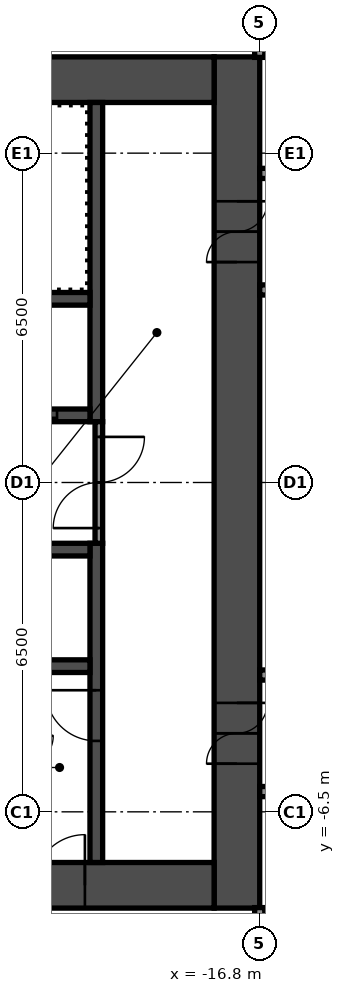
"""IFC4 building model, lengths in metres.
Left out: names, types, materials, properties, quantities, classifications, styles, units other than length and angle.
Written with IfcOpenShell. Run it as: python <this file> out.ifc"""

import sys

from ifc_helpers import new_model, si_unit, direction, frame, frame_2d, origin, place, context, subcontext, project, spatial, rectangle, extrude, element, fill, save


model = new_model("IFC4")
c1 = context("Model", 3, precision=1e-05, world=origin(), true_north=direction((0.0, 1.0)))
c2 = subcontext(c1, "Body", "Model", "MODEL_VIEW")
j1 = project(units=[si_unit("LENGTHUNIT", "METRE"), si_unit("PLANEANGLEUNIT", "RADIAN")], contexts=[c1])
p1 = place(None, origin())
s1 = spatial("IfcSite", under=j1, at=p1, CompositionType="ELEMENT")
p2 = place(p1, origin())
s2 = spatial("IfcBuilding", under=s1, at=p2, CompositionType="ELEMENT")
p3 = place(p2, frame((0.0, 0.0, 19.8)))
s3 = spatial("IfcBuildingStorey", under=s2, at=p3, CompositionType="ELEMENT", Elevation=19.8)
p4 = place(p3, frame((-17.25, -8.4, 0.0), z_axis=(0.0, 0.0, 1.0), x_axis=(0.0, 1.0, 0.0)))
e1 = element("IfcWall", 1, at=p4, inside=s3, PredefinedType="SHEAR", context=c2, shape_type="SweptSolid", body=[
    extrude(rectangle(XDim=16.8, YDim=0.9, at=frame_2d((8.4, 0.0))), origin(), (0.0, 0.0, 1.0), 2.8),
])
p5 = place(p4, frame((12.75, 0.0, 0.0)))
e2 = element("IfcOpeningElement", 2, at=p5, cuts=e1, PredefinedType="OPENING", context=c2, shape_type="SweptSolid", body=[
    extrude(rectangle(XDim=1.2, YDim=2.1, at=frame_2d((0.6, 1.05))), frame((0.0, 0.46, 0.0), z_axis=(0.0, -1.0, 0.0), x_axis=(1.0, 0.0, 0.0)), (0.0, 0.0, 1.0), 0.92),
])
p6 = place(p4, frame((2.85, 0.0, 0.0)))
e3 = element("IfcOpeningElement", 3, at=p6, cuts=e1, PredefinedType="OPENING", context=c2, shape_type="SweptSolid", body=[
    extrude(rectangle(XDim=1.2, YDim=2.1, at=frame_2d((0.6, 1.05))), frame((0.0, 0.46, 0.0), z_axis=(0.0, -1.0, 0.0), x_axis=(1.0, 0.0, 0.0)), (0.0, 0.0, 1.0), 0.92),
])
p7 = place(p3, frame((-32.7, 7.95, 0.0), z_axis=(0.0, 0.0, 1.0), x_axis=(1.0, 0.0, 0.0)))
e4 = element("IfcWall", 4, at=p7, inside=s3, PredefinedType="SHEAR", context=c2, shape_type="SweptSolid", body=[
    extrude(rectangle(XDim=15.0, YDim=0.9, at=frame_2d((7.5, 0.0))), origin(), (0.0, 0.0, 1.0), 2.8),
])
p8 = place(p7, frame((3.4, 0.0, 0.0)))
e5 = element("IfcOpeningElement", 5, at=p8, cuts=e4, PredefinedType="OPENING", context=c2, shape_type="SweptSolid", body=[
    extrude(rectangle(XDim=1.2, YDim=2.1, at=frame_2d((0.6, 1.05))), frame((0.0, 0.46, 0.0), z_axis=(0.0, -1.0, 0.0), x_axis=(1.0, 0.0, 0.0)), (0.0, 0.0, 1.0), 0.92),
])
p9 = place(p7, frame((0.75, 0.0, 0.0)))
e6 = element("IfcOpeningElement", 6, at=p9, cuts=e4, PredefinedType="OPENING", context=c2, shape_type="SweptSolid", body=[
    extrude(rectangle(XDim=0.9, YDim=2.1, at=frame_2d((0.45, 1.05))), frame((0.0, 0.46, 0.0), z_axis=(0.0, -1.0, 0.0), x_axis=(1.0, 0.0, 0.0)), (0.0, 0.0, 1.0), 0.92),
])
p10 = place(p3, frame((-32.7, -7.95, 0.0), z_axis=(0.0, 0.0, 1.0), x_axis=(1.0, 0.0, 0.0)))
e7 = element("IfcWall", 7, at=p10, inside=s3, PredefinedType="SHEAR", context=c2, shape_type="SweptSolid", body=[
    extrude(rectangle(XDim=15.0, YDim=0.9, at=frame_2d((7.5, 0.0))), origin(), (0.0, 0.0, 1.0), 2.8),
])
p11 = place(p10, frame((11.45, 0.0, 0.0)))
e8 = element("IfcOpeningElement", 8, at=p11, cuts=e7, PredefinedType="OPENING", context=c2, shape_type="SweptSolid", body=[
    extrude(rectangle(XDim=1.0, YDim=2.1, at=frame_2d((0.5, 1.05))), frame((0.0, 0.46, 0.0), z_axis=(0.0, -1.0, 0.0), x_axis=(1.0, 0.0, 0.0)), (0.0, 0.0, 1.0), 0.92),
])
p12 = place(p3, frame((-20.025, 1.2, 0.0), z_axis=(0.0, 0.0, 1.0), x_axis=(0.0, 1.0, 0.0)))
e9 = element("IfcWall", 9, at=p12, inside=s3, PredefinedType="SHEAR", context=c2, shape_type="SweptSolid", body=[
    extrude(rectangle(XDim=6.3, YDim=0.25, at=frame_2d((3.15, 0.0))), origin(), (0.0, 0.0, 1.0), 2.8),
])
p13 = place(p3, frame((-20.025, -7.5, 0.0), z_axis=(0.0, 0.0, 1.0), x_axis=(0.0, 1.0, 0.0)))
e10 = element("IfcWall", 10, at=p13, inside=s3, PredefinedType="SHEAR", context=c2, shape_type="SweptSolid", body=[
    extrude(rectangle(XDim=6.3, YDim=0.25, at=frame_2d((3.15, 0.0))), origin(), (0.0, 0.0, 1.0), 2.8),
])
p14 = place(p13, frame((2.4, 0.0, 0.0)))
e11 = element("IfcOpeningElement", 11, at=p14, cuts=e10, PredefinedType="OPENING", context=c2, shape_type="SweptSolid", body=[
    extrude(rectangle(XDim=1.0, YDim=2.1, at=frame_2d((0.5, 1.05))), frame((0.0, 0.135, 0.0), z_axis=(0.0, -1.0, 0.0), x_axis=(1.0, 0.0, 0.0)), (0.0, 0.0, 1.0), 0.27),
])
p15 = place(p3, frame((-27.65, 1.325, 0.0), z_axis=(0.0, 0.0, 1.0), x_axis=(1.0, 0.0, 0.0)))
e12 = element("IfcWall", 12, at=p15, inside=s3, PredefinedType="SHEAR", context=c2, shape_type="SweptSolid", body=[
    extrude(rectangle(XDim=7.5, YDim=0.25, at=frame_2d((3.75, 0.0))), origin(), (0.0, 0.0, 1.0), 2.8),
])
p16 = place(p15, frame((5.75, 0.0, 0.0)))
e13 = element("IfcOpeningElement", 13, at=p16, cuts=e12, PredefinedType="OPENING", context=c2, shape_type="SweptSolid", body=[
    extrude(rectangle(XDim=1.1, YDim=2.1, at=frame_2d((0.55, 1.05))), frame((0.0, 0.135, 0.0), z_axis=(0.0, -1.0, 0.0), x_axis=(1.0, 0.0, 0.0)), (0.0, 0.0, 1.0), 0.27),
])
p17 = place(p15, frame((3.35, 0.0, 0.0)))
e14 = element("IfcOpeningElement", 14, at=p17, cuts=e12, PredefinedType="OPENING", context=c2, shape_type="SweptSolid", body=[
    extrude(rectangle(XDim=1.1, YDim=2.1, at=frame_2d((0.55, 1.05))), frame((0.0, 0.135, 0.0), z_axis=(0.0, -1.0, 0.0), x_axis=(1.0, 0.0, 0.0)), (0.0, 0.0, 1.0), 0.27),
])
p18 = place(p15, frame((0.95, 0.0, 0.0)))
e15 = element("IfcOpeningElement", 15, at=p18, cuts=e12, PredefinedType="OPENING", context=c2, shape_type="SweptSolid", body=[
    extrude(rectangle(XDim=1.1, YDim=2.1, at=frame_2d((0.55, 1.05))), frame((0.0, 0.135, 0.0), z_axis=(0.0, -1.0, 0.0), x_axis=(1.0, 0.0, 0.0)), (0.0, 0.0, 1.0), 0.27),
])
for number, where, z_axis, x_axis in (
    (16, (-27.65, 3.625, 0.0), (0.0, 0.0, 1.0), (1.0, 0.0, 0.0)),
    (17, (-27.65, -1.325, 0.0), (0.0, 0.0, 1.0), (1.0, 0.0, 0.0)),
    (18, (-27.65, -3.625, 0.0), (0.0, 0.0, 1.0), (1.0, 0.0, 0.0)),
):
    element("IfcWall", number, at=place(p3, frame(where, z_axis=z_axis, x_axis=x_axis)), inside=s3, PredefinedType="SHEAR", context=c2, shape_type="SweptSolid", body=[
        extrude(rectangle(XDim=7.5, YDim=0.25, at=frame_2d((3.75, 0.0))), origin(), (0.0, 0.0, 1.0), 2.8),
    ])
p19 = place(p3, frame((-19.975, -1.2, 0.0), z_axis=(0.0, 0.0, 1.0), x_axis=(0.0, 1.0, 0.0)))
e19 = element("IfcWall", 19, at=p19, inside=s3, PredefinedType="PARTITIONING", context=c2, shape_type="SweptSolid", body=[
    extrude(rectangle(XDim=2.4, YDim=0.15, at=frame_2d((1.2, 0.0))), origin(), (0.0, 0.0, 1.0), 2.8),
])
p20 = place(p19, frame((0.3, 0.0, 0.0)))
e20 = element("IfcOpeningElement", 20, at=p20, cuts=e19, PredefinedType="OPENING", context=c2, shape_type="SweptSolid", body=[
    extrude(rectangle(XDim=1.8, YDim=2.1, at=frame_2d((0.9, 1.05))), frame((0.0, 0.085, 0.0), z_axis=(0.0, -1.0, 0.0), x_axis=(1.0, 0.0, 0.0)), (0.0, 0.0, 1.0), 0.17),
])
p21 = place(p3, frame((-16.8, -6.1, 0.0), z_axis=(0.0, 0.0, 1.0), x_axis=(1.0, 0.0, 0.0)))
e21 = element("IfcWall", 21, at=p21, inside=s3, PredefinedType="PARTITIONING", context=c2, shape_type="SweptSolid", body=[
    extrude(rectangle(XDim=33.6, YDim=0.2, at=frame_2d((16.8, 0.0))), origin(), (0.0, 0.0, 1.0), 2.8),
])
p22 = place(p21, frame((5.4, 0.0, 0.0)))
e22 = element("IfcOpeningElement", 22, at=p22, cuts=e21, PredefinedType="OPENING", context=c2, shape_type="SweptSolid", body=[
    extrude(rectangle(XDim=1.0, YDim=2.1, at=frame_2d((0.5, 1.05))), frame((0.0, 0.11, 0.0), z_axis=(0.0, -1.0, 0.0), x_axis=(1.0, 0.0, 0.0)), (0.0, 0.0, 1.0), 0.22),
])
p23 = place(p21, frame((12.1, 0.0, 0.0)))
e23 = element("IfcOpeningElement", 23, at=p23, cuts=e21, PredefinedType="OPENING", context=c2, shape_type="SweptSolid", body=[
    extrude(rectangle(XDim=1.0, YDim=2.1, at=frame_2d((0.5, 1.05))), frame((0.0, 0.11, 0.0), z_axis=(0.0, -1.0, 0.0), x_axis=(1.0, 0.0, 0.0)), (0.0, 0.0, 1.0), 0.22),
])
p24 = place(p21, frame((18.8, 0.0, 0.0)))
e24 = element("IfcOpeningElement", 24, at=p24, cuts=e21, PredefinedType="OPENING", context=c2, shape_type="SweptSolid", body=[
    extrude(rectangle(XDim=1.0, YDim=2.1, at=frame_2d((0.5, 1.05))), frame((0.0, 0.11, 0.0), z_axis=(0.0, -1.0, 0.0), x_axis=(1.0, 0.0, 0.0)), (0.0, 0.0, 1.0), 0.22),
])
p25 = place(p21, frame((30.6, 0.0, 0.0)))
e25 = element("IfcOpeningElement", 25, at=p25, cuts=e21, PredefinedType="OPENING", context=c2, shape_type="SweptSolid", body=[
    extrude(rectangle(XDim=1.0, YDim=2.1, at=frame_2d((0.5, 1.05))), frame((0.0, 0.11, 0.0), z_axis=(0.0, -1.0, 0.0), x_axis=(1.0, 0.0, 0.0)), (0.0, 0.0, 1.0), 0.22),
])
p26 = place(p3, frame((-16.8, -3.8, 0.0), z_axis=(0.0, 0.0, 1.0), x_axis=(1.0, 0.0, 0.0)))
e26 = element("IfcWall", 26, at=p26, inside=s3, PredefinedType="PARTITIONING", context=c2, shape_type="SweptSolid", body=[
    extrude(rectangle(XDim=33.6, YDim=0.2, at=frame_2d((16.8, 0.0))), origin(), (0.0, 0.0, 1.0), 2.8),
])
p27 = place(p26, frame((9.88, 0.0, 0.0)))
e27 = element("IfcOpeningElement", 27, at=p27, cuts=e26, PredefinedType="OPENING", context=c2, shape_type="SweptSolid", body=[
    extrude(rectangle(XDim=0.9, YDim=2.1, at=frame_2d((0.45, 1.05))), frame((0.0, 0.11, 0.0), z_axis=(0.0, -1.0, 0.0), x_axis=(1.0, 0.0, 0.0)), (0.0, 0.0, 1.0), 0.22),
])
p28 = place(p26, frame((14.08, 0.0, 0.0)))
e28 = element("IfcOpeningElement", 28, at=p28, cuts=e26, PredefinedType="OPENING", context=c2, shape_type="SweptSolid", body=[
    extrude(rectangle(XDim=0.9, YDim=2.1, at=frame_2d((0.45, 1.05))), frame((0.0, 0.11, 0.0), z_axis=(0.0, -1.0, 0.0), x_axis=(1.0, 0.0, 0.0)), (0.0, 0.0, 1.0), 0.22),
])
p29 = place(p26, frame((27.355, 0.0, 0.0)))
e29 = element("IfcOpeningElement", 29, at=p29, cuts=e26, PredefinedType="OPENING", context=c2, shape_type="SweptSolid", body=[
    extrude(rectangle(XDim=0.9, YDim=2.1, at=frame_2d((0.45, 1.05))), frame((0.0, 0.11, 0.0), z_axis=(0.0, -1.0, 0.0), x_axis=(1.0, 0.0, 0.0)), (0.0, 0.0, 1.0), 0.22),
])
p30 = place(p26, frame((31.555, 0.0, 0.0)))
e30 = element("IfcOpeningElement", 30, at=p30, cuts=e26, PredefinedType="OPENING", context=c2, shape_type="SweptSolid", body=[
    extrude(rectangle(XDim=0.9, YDim=2.1, at=frame_2d((0.45, 1.05))), frame((0.0, 0.11, 0.0), z_axis=(0.0, -1.0, 0.0), x_axis=(1.0, 0.0, 0.0)), (0.0, 0.0, 1.0), 0.22),
])
p31 = place(p3, frame((-16.8, 3.8, 0.0), z_axis=(0.0, 0.0, 1.0), x_axis=(1.0, 0.0, 0.0)))
e31 = element("IfcWall", 31, at=p31, inside=s3, PredefinedType="PARTITIONING", context=c2, shape_type="SweptSolid", body=[
    extrude(rectangle(XDim=33.6, YDim=0.2, at=frame_2d((16.8, 0.0))), origin(), (0.0, 0.0, 1.0), 2.8),
])
p32 = place(p31, frame((2.24, 0.0, 0.0)))
e32 = element("IfcOpeningElement", 32, at=p32, cuts=e31, PredefinedType="OPENING", context=c2, shape_type="SweptSolid", body=[
    extrude(rectangle(XDim=0.9, YDim=2.1, at=frame_2d((0.45, 1.05))), frame((0.0, 0.11, 0.0), z_axis=(0.0, -1.0, 0.0), x_axis=(1.0, 0.0, 0.0)), (0.0, 0.0, 1.0), 0.22),
])
p33 = place(p31, frame((6.44, 0.0, 0.0)))
e33 = element("IfcOpeningElement", 33, at=p33, cuts=e31, PredefinedType="OPENING", context=c2, shape_type="SweptSolid", body=[
    extrude(rectangle(XDim=0.9, YDim=2.1, at=frame_2d((0.45, 1.05))), frame((0.0, 0.11, 0.0), z_axis=(0.0, -1.0, 0.0), x_axis=(1.0, 0.0, 0.0)), (0.0, 0.0, 1.0), 0.22),
])
p34 = place(p31, frame((18.03, 0.0, 0.0)))
e34 = element("IfcOpeningElement", 34, at=p34, cuts=e31, PredefinedType="OPENING", context=c2, shape_type="SweptSolid", body=[
    extrude(rectangle(XDim=0.9, YDim=2.1, at=frame_2d((0.45, 1.05))), frame((0.0, 0.11, 0.0), z_axis=(0.0, -1.0, 0.0), x_axis=(1.0, 0.0, 0.0)), (0.0, 0.0, 1.0), 0.22),
])
p35 = place(p31, frame((22.23, 0.0, 0.0)))
e35 = element("IfcOpeningElement", 35, at=p35, cuts=e31, PredefinedType="OPENING", context=c2, shape_type="SweptSolid", body=[
    extrude(rectangle(XDim=0.9, YDim=2.1, at=frame_2d((0.45, 1.05))), frame((0.0, 0.11, 0.0), z_axis=(0.0, -1.0, 0.0), x_axis=(1.0, 0.0, 0.0)), (0.0, 0.0, 1.0), 0.22),
])
p36 = place(p3, frame((-16.8, 6.1, 0.0), z_axis=(0.0, 0.0, 1.0), x_axis=(1.0, 0.0, 0.0)))
e36 = element("IfcWall", 36, at=p36, inside=s3, PredefinedType="PARTITIONING", context=c2, shape_type="SweptSolid", body=[
    extrude(rectangle(XDim=33.6, YDim=0.2, at=frame_2d((16.8, 0.0))), origin(), (0.0, 0.0, 1.0), 2.8),
])
p37 = place(p36, frame((5.4, 0.0, 0.0)))
e37 = element("IfcOpeningElement", 37, at=p37, cuts=e36, PredefinedType="OPENING", context=c2, shape_type="SweptSolid", body=[
    extrude(rectangle(XDim=1.0, YDim=2.1, at=frame_2d((0.5, 1.05))), frame((0.0, 0.11, 0.0), z_axis=(0.0, -1.0, 0.0), x_axis=(1.0, 0.0, 0.0)), (0.0, 0.0, 1.0), 0.22),
])
p38 = place(p36, frame((12.1, 0.0, 0.0)))
e38 = element("IfcOpeningElement", 38, at=p38, cuts=e36, PredefinedType="OPENING", context=c2, shape_type="SweptSolid", body=[
    extrude(rectangle(XDim=1.0, YDim=2.1, at=frame_2d((0.5, 1.05))), frame((0.0, 0.11, 0.0), z_axis=(0.0, -1.0, 0.0), x_axis=(1.0, 0.0, 0.0)), (0.0, 0.0, 1.0), 0.22),
])
p39 = place(p36, frame((18.87, 0.0, 0.0)))
e39 = element("IfcOpeningElement", 39, at=p39, cuts=e36, PredefinedType="OPENING", context=c2, shape_type="SweptSolid", body=[
    extrude(rectangle(XDim=0.9, YDim=2.1, at=frame_2d((0.45, 1.05))), frame((0.0, 0.11, 0.0), z_axis=(0.0, -1.0, 0.0), x_axis=(1.0, 0.0, 0.0)), (0.0, 0.0, 1.0), 0.22),
])
p40 = place(p36, frame((23.07, 0.0, 0.0)))
e40 = element("IfcOpeningElement", 40, at=p40, cuts=e36, PredefinedType="OPENING", context=c2, shape_type="SweptSolid", body=[
    extrude(rectangle(XDim=0.9, YDim=2.1, at=frame_2d((0.45, 1.05))), frame((0.0, 0.11, 0.0), z_axis=(0.0, -1.0, 0.0), x_axis=(1.0, 0.0, 0.0)), (0.0, 0.0, 1.0), 0.22),
])
p41 = place(p36, frame((27.2, 0.0, 0.0)))
e41 = element("IfcOpeningElement", 41, at=p41, cuts=e36, PredefinedType="OPENING", context=c2, shape_type="SweptSolid", body=[
    extrude(rectangle(XDim=1.0, YDim=2.1, at=frame_2d((0.5, 1.05))), frame((0.0, 0.11, 0.0), z_axis=(0.0, -1.0, 0.0), x_axis=(1.0, 0.0, 0.0)), (0.0, 0.0, 1.0), 0.22),
])
for number, where, z_axis, x_axis in (
    (42, (-16.8, -20.3, 0.0), (0.0, 0.0, 1.0), (0.0, 1.0, 0.0)),
    (43, (-16.8, 8.39, 0.0), (0.0, 0.0, 1.0), (0.0, 1.0, 0.0)),
):
    element("IfcWall", number, at=place(p3, frame(where, z_axis=z_axis, x_axis=x_axis)), inside=s3, PredefinedType="PARTITIONING", context=c2, shape_type="SweptSolid", body=[
        extrude(rectangle(XDim=11.91, YDim=0.2, at=frame_2d((5.955, 0.0))), origin(), (0.0, 0.0, 1.0), 2.8),
    ])
p42 = place(p5, origin())
e44 = element("IfcDoor", 44, at=p42, inside=s3, OperationType="DOUBLE_DOOR_SINGLE_SWING", PredefinedType="DOOR", context=c2, shape_type="SweptSolid", body=[
    extrude(rectangle(XDim=1.2, YDim=2.1, at=frame_2d((0.6, 1.05))), frame((0.0, 0.025, 0.0), z_axis=(0.0, -1.0, 0.0), x_axis=(1.0, 0.0, 0.0)), (0.0, 0.0, 1.0), 0.05),
])
fill(e2, e44)
p43 = place(p6, origin())
e45 = element("IfcDoor", 45, at=p43, inside=s3, OperationType="DOUBLE_DOOR_SINGLE_SWING", PredefinedType="DOOR", context=c2, shape_type="SweptSolid", body=[
    extrude(rectangle(XDim=1.2, YDim=2.1, at=frame_2d((0.6, 1.05))), frame((0.0, 0.025, 0.0), z_axis=(0.0, -1.0, 0.0), x_axis=(1.0, 0.0, 0.0)), (0.0, 0.0, 1.0), 0.05),
])
fill(e3, e45)
p44 = place(p11, origin())
e46 = element("IfcDoor", 46, at=p44, inside=s3, OperationType="SINGLE_SWING_LEFT", PredefinedType="DOOR", context=c2, shape_type="SweptSolid", body=[
    extrude(rectangle(XDim=1.0, YDim=2.1, at=frame_2d((0.5, 1.05))), frame((0.0, 0.025, 0.0), z_axis=(0.0, -1.0, 0.0), x_axis=(1.0, 0.0, 0.0)), (0.0, 0.0, 1.0), 0.05),
])
fill(e8, e46)
p45 = place(p14, origin())
e47 = element("IfcDoor", 47, at=p45, inside=s3, OperationType="SINGLE_SWING_LEFT", PredefinedType="DOOR", context=c2, shape_type="SweptSolid", body=[
    extrude(rectangle(XDim=1.0, YDim=2.1, at=frame_2d((0.5, 1.05))), frame((0.0, 0.025, 0.0), z_axis=(0.0, -1.0, 0.0), x_axis=(1.0, 0.0, 0.0)), (0.0, 0.0, 1.0), 0.05),
])
fill(e11, e47)
p46 = place(p20, origin())
e48 = element("IfcDoor", 48, at=p46, inside=s3, OperationType="DOUBLE_DOOR_SINGLE_SWING", PredefinedType="DOOR", context=c2, shape_type="SweptSolid", body=[
    extrude(rectangle(XDim=1.8, YDim=2.1, at=frame_2d((0.9, 1.05))), frame((0.0, 0.025, 0.0), z_axis=(0.0, -1.0, 0.0), x_axis=(1.0, 0.0, 0.0)), (0.0, 0.0, 1.0), 0.05),
])
fill(e20, e48)
p47 = place(p16, origin())
e49 = element("IfcDoor", 49, at=p47, inside=s3, OperationType="DOUBLE_DOOR_SLIDING", PredefinedType="DOOR", context=c2, shape_type="SweptSolid", body=[
    extrude(rectangle(XDim=1.1, YDim=2.1, at=frame_2d((0.55, 1.05))), frame((0.0, 0.025, 0.0), z_axis=(0.0, -1.0, 0.0), x_axis=(1.0, 0.0, 0.0)), (0.0, 0.0, 1.0), 0.05),
])
fill(e13, e49)
save(model, sys.argv[1])
